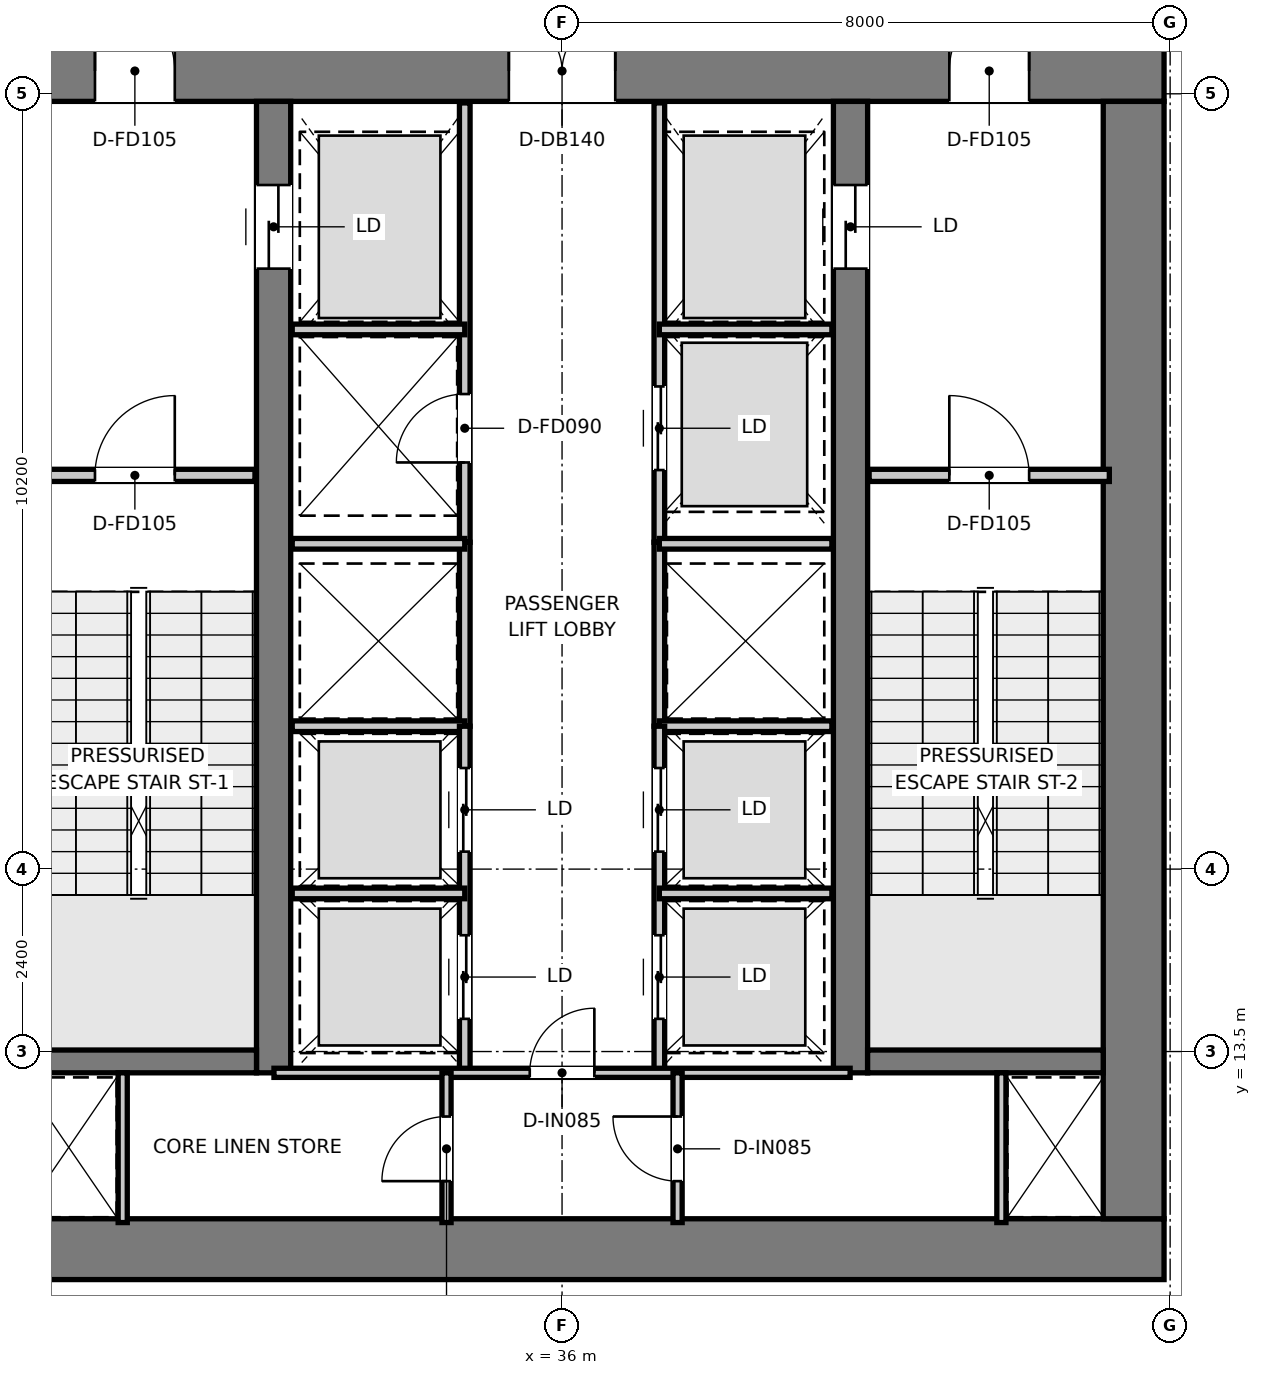
"""IFC4 building model, lengths in metres.
Left out: names, types, materials, properties, quantities, classifications, styles, units other than length and angle.
Written with IfcOpenShell. Run it as: python <this file> out.ifc"""

import sys

from ifc_helpers import new_model, si_unit, direction, frame, frame_2d, origin, place, context, subcontext, project, spatial, rectangle, extrude, element, fill, save


model = new_model("IFC4")
c1 = context("Model", 3, precision=1e-05, world=origin(), true_north=direction((0.0, 1.0)))
c2 = subcontext(c1, "Body", "Model", "MODEL_VIEW")
j1 = project(units=[si_unit("LENGTHUNIT", "METRE"), si_unit("PLANEANGLEUNIT", "RADIAN")], contexts=[c1])
p1 = place(None, origin())
s1 = spatial("IfcSite", under=j1, at=p1, CompositionType="ELEMENT")
p2 = place(p1, origin())
s2 = spatial("IfcBuilding", under=s1, at=p2, CompositionType="ELEMENT")
p3 = place(p2, frame((0.0, 0.0, 5.4)))
s3 = spatial("IfcBuildingStorey", under=s2, at=p3, CompositionType="ELEMENT", Elevation=5.4)
p4 = place(p3, frame((28.08, 10.9, 0.0), z_axis=(0.0, 0.0, 1.0), x_axis=(1.0, 0.0, 0.0)))
e1 = element("IfcWall", 1, at=p4, inside=s3, PredefinedType="SHEAR", context=c2, shape_type="SweptSolid", body=[
    extrude(rectangle(XDim=15.84, YDim=0.8, at=frame_2d((7.92, 0.0))), origin(), (0.0, 0.0, 1.0), 5.0),
])
p5 = place(p3, frame((28.08, 26.4, 0.0), z_axis=(0.0, 0.0, 1.0), x_axis=(1.0, 0.0, 0.0)))
e2 = element("IfcWall", 2, at=p5, inside=s3, PredefinedType="SHEAR", context=c2, shape_type="SweptSolid", body=[
    extrude(rectangle(XDim=15.84, YDim=0.8, at=frame_2d((7.92, 0.0))), origin(), (0.0, 0.0, 1.0), 5.0),
])
p6 = place(p5, frame((7.22, 0.0, 0.0)))
e3 = element("IfcOpeningElement", 3, at=p6, cuts=e2, PredefinedType="OPENING", context=c2, shape_type="SweptSolid", body=[
    extrude(rectangle(XDim=1.4, YDim=2.2, at=frame_2d((0.7, 1.1))), frame((0.0, 0.41, 0.0), z_axis=(0.0, -1.0, 0.0), x_axis=(1.0, 0.0, 0.0)), (0.0, 0.0, 1.0), 0.82),
])
p7 = place(p5, frame((1.775, 0.0, 0.0)))
e4 = element("IfcOpeningElement", 4, at=p7, cuts=e2, PredefinedType="OPENING", context=c2, shape_type="SweptSolid", body=[
    extrude(rectangle(XDim=1.05, YDim=2.1, at=frame_2d((0.525, 1.05))), frame((0.0, 0.41, 0.0), z_axis=(0.0, -1.0, 0.0), x_axis=(1.0, 0.0, 0.0)), (0.0, 0.0, 1.0), 0.82),
])
p8 = place(p5, frame((13.015, 0.0, 0.0)))
e5 = element("IfcOpeningElement", 5, at=p8, cuts=e2, PredefinedType="OPENING", context=c2, shape_type="SweptSolid", body=[
    extrude(rectangle(XDim=1.05, YDim=2.1, at=frame_2d((0.525, 1.05))), frame((0.0, 0.41, 0.0), z_axis=(0.0, -1.0, 0.0), x_axis=(1.0, 0.0, 0.0)), (0.0, 0.0, 1.0), 0.82),
])
p9 = place(p3, frame((43.52, 11.3, 0.0), z_axis=(0.0, 0.0, 1.0), x_axis=(0.0, 1.0, 0.0)))
e6 = element("IfcWall", 6, at=p9, inside=s3, PredefinedType="SHEAR", context=c2, shape_type="SweptSolid", body=[
    extrude(rectangle(XDim=14.7, YDim=0.8, at=frame_2d((7.35, 0.0))), origin(), (0.0, 0.0, 1.0), 5.0),
])
p10 = place(p3, frame((32.205, 13.22, 0.0), z_axis=(0.0, 0.0, 1.0), x_axis=(0.0, 1.0, 0.0)))
e7 = element("IfcWall", 7, at=p10, inside=s3, PredefinedType="SHEAR", context=c2, shape_type="SweptSolid", body=[
    extrude(rectangle(XDim=12.78, YDim=0.45, at=frame_2d((6.39, 0.0))), origin(), (0.0, 0.0, 1.0), 5.0),
])
p11 = place(p10, frame((10.58, 0.0, 0.0)))
e8 = element("IfcOpeningElement", 8, at=p11, cuts=e7, PredefinedType="OPENING", context=c2, shape_type="SweptSolid", body=[
    extrude(rectangle(XDim=1.1, YDim=2.15, at=frame_2d((0.55, 1.075))), frame((0.0, 0.235, 0.0), z_axis=(0.0, -1.0, 0.0), x_axis=(1.0, 0.0, 0.0)), (0.0, 0.0, 1.0), 0.47),
])
p12 = place(p3, frame((39.795, 13.22, 0.0), z_axis=(0.0, 0.0, 1.0), x_axis=(0.0, 1.0, 0.0)))
e9 = element("IfcWall", 9, at=p12, inside=s3, PredefinedType="SHEAR", context=c2, shape_type="SweptSolid", body=[
    extrude(rectangle(XDim=12.78, YDim=0.45, at=frame_2d((6.39, 0.0))), origin(), (0.0, 0.0, 1.0), 5.0),
])
p13 = place(p12, frame((10.58, 0.0, 0.0)))
e10 = element("IfcOpeningElement", 10, at=p13, cuts=e9, PredefinedType="OPENING", context=c2, shape_type="SweptSolid", body=[
    extrude(rectangle(XDim=1.1, YDim=2.15, at=frame_2d((0.55, 1.075))), frame((0.0, 0.235, 0.0), z_axis=(0.0, -1.0, 0.0), x_axis=(1.0, 0.0, 0.0)), (0.0, 0.0, 1.0), 0.47),
])
for number, where, z_axis, x_axis in (
    (11, (28.88, 13.37, 0.0), (0.0, 0.0, 1.0), (1.0, 0.0, 0.0)),
    (12, (40.02, 13.37, 0.0), (0.0, 0.0, 1.0), (1.0, 0.0, 0.0)),
):
    element("IfcWall", number, at=place(p3, frame(where, z_axis=z_axis, x_axis=x_axis)), inside=s3, PredefinedType="SHEAR", context=c2, shape_type="SweptSolid", body=[
        extrude(rectangle(XDim=3.1, YDim=0.3, at=frame_2d((1.55, 0.0))), origin(), (0.0, 0.0, 1.0), 5.0),
    ])
p14 = place(p3, frame((28.8, 21.08, 0.0), z_axis=(0.0, 0.0, 1.0), x_axis=(1.0, 0.0, 0.0)))
e13 = element("IfcWall", 13, at=p14, inside=s3, PredefinedType="PARTITIONING", context=c2, shape_type="SweptSolid", body=[
    extrude(rectangle(XDim=3.16, YDim=0.16, at=frame_2d((1.58, 0.0))), origin(), (0.0, 0.0, 1.0), 4.7),
])
p15 = place(p14, frame((1.055, 0.0, 0.0)))
e14 = element("IfcOpeningElement", 14, at=p15, cuts=e13, PredefinedType="OPENING", context=c2, shape_type="SweptSolid", body=[
    extrude(rectangle(XDim=1.05, YDim=2.1, at=frame_2d((0.525, 1.05))), frame((0.0, 0.09, 0.0), z_axis=(0.0, -1.0, 0.0), x_axis=(1.0, 0.0, 0.0)), (0.0, 0.0, 1.0), 0.18),
])
p16 = place(p3, frame((40.04, 21.08, 0.0), z_axis=(0.0, 0.0, 1.0), x_axis=(1.0, 0.0, 0.0)))
e15 = element("IfcWall", 15, at=p16, inside=s3, PredefinedType="PARTITIONING", context=c2, shape_type="SweptSolid", body=[
    extrude(rectangle(XDim=3.16, YDim=0.16, at=frame_2d((1.58, 0.0))), origin(), (0.0, 0.0, 1.0), 4.7),
])
p17 = place(p16, frame((1.055, 0.0, 0.0)))
e16 = element("IfcOpeningElement", 16, at=p17, cuts=e15, PredefinedType="OPENING", context=c2, shape_type="SweptSolid", body=[
    extrude(rectangle(XDim=1.05, YDim=2.1, at=frame_2d((0.525, 1.05))), frame((0.0, 0.09, 0.0), z_axis=(0.0, -1.0, 0.0), x_axis=(1.0, 0.0, 0.0)), (0.0, 0.0, 1.0), 0.18),
])
p18 = place(p3, frame((34.72, 20.2, 0.0), z_axis=(0.0, 0.0, 1.0), x_axis=(0.0, 1.0, 0.0)))
e17 = element("IfcWall", 17, at=p18, inside=s3, PredefinedType="PARTITIONING", context=c2, shape_type="SweptSolid", body=[
    extrude(rectangle(XDim=5.78, YDim=0.14, at=frame_2d((2.89, 0.0))), origin(), (0.0, 0.0, 1.0), 3.5),
])
p19 = place(p18, frame((1.05, 0.0, 0.0)))
e18 = element("IfcOpeningElement", 18, at=p19, cuts=e17, PredefinedType="OPENING", context=c2, shape_type="SweptSolid", body=[
    extrude(rectangle(XDim=0.9, YDim=2.1, at=frame_2d((0.45, 1.05))), frame((0.0, 0.08, 0.0), z_axis=(0.0, -1.0, 0.0), x_axis=(1.0, 0.0, 0.0)), (0.0, 0.0, 1.0), 0.16),
])
p20 = place(p3, frame((37.28, 20.2, 0.0), z_axis=(0.0, 0.0, 1.0), x_axis=(0.0, 1.0, 0.0)))
e19 = element("IfcWall", 19, at=p20, inside=s3, PredefinedType="PARTITIONING", context=c2, shape_type="SweptSolid", body=[
    extrude(rectangle(XDim=5.78, YDim=0.14, at=frame_2d((2.89, 0.0))), origin(), (0.0, 0.0, 1.0), 3.5),
])
p21 = place(p20, frame((0.95, 0.0, 0.0)))
e20 = element("IfcOpeningElement", 20, at=p21, cuts=e19, PredefinedType="OPENING", context=c2, shape_type="SweptSolid", body=[
    extrude(rectangle(XDim=1.1, YDim=2.15, at=frame_2d((0.55, 1.075))), frame((0.0, 0.08, 0.0), z_axis=(0.0, -1.0, 0.0), x_axis=(1.0, 0.0, 0.0)), (0.0, 0.0, 1.0), 0.16),
])
for number, where, z_axis, x_axis in (
    (21, (32.45, 23.0, 0.0), (0.0, 0.0, 1.0), (1.0, 0.0, 0.0)),
    (22, (37.28, 23.0, 0.0), (0.0, 0.0, 1.0), (1.0, 0.0, 0.0)),
):
    element("IfcWall", number, at=place(p3, frame(where, z_axis=z_axis, x_axis=x_axis)), inside=s3, PredefinedType="PARTITIONING", context=c2, shape_type="SweptSolid", body=[
        extrude(rectangle(XDim=2.27, YDim=0.14, at=frame_2d((1.135, 0.0))), origin(), (0.0, 0.0, 1.0), 3.5),
    ])
for number, where, z_axis, x_axis in (
    (23, (34.72, 17.78, 0.0), (0.0, 0.0, 1.0), (0.0, 1.0, 0.0)),
    (24, (37.28, 17.78, 0.0), (0.0, 0.0, 1.0), (0.0, 1.0, 0.0)),
):
    element("IfcWall", number, at=place(p3, frame(where, z_axis=z_axis, x_axis=x_axis)), inside=s3, PredefinedType="PARTITIONING", context=c2, shape_type="SweptSolid", body=[
        extrude(rectangle(XDim=2.42, YDim=0.14, at=frame_2d((1.21, 0.0))), origin(), (0.0, 0.0, 1.0), 4.7),
    ])
for number, where, z_axis, x_axis in (
    (25, (32.45, 17.78, 0.0), (0.0, 0.0, 1.0), (1.0, 0.0, 0.0)),
    (26, (32.45, 20.18, 0.0), (0.0, 0.0, 1.0), (1.0, 0.0, 0.0)),
    (27, (37.28, 17.78, 0.0), (0.0, 0.0, 1.0), (1.0, 0.0, 0.0)),
    (28, (37.28, 20.18, 0.0), (0.0, 0.0, 1.0), (1.0, 0.0, 0.0)),
):
    element("IfcWall", number, at=place(p3, frame(where, z_axis=z_axis, x_axis=x_axis)), inside=s3, PredefinedType="PARTITIONING", context=c2, shape_type="SweptSolid", body=[
        extrude(rectangle(XDim=2.27, YDim=0.14, at=frame_2d((1.135, 0.0))), origin(), (0.0, 0.0, 1.0), 4.7),
    ])
p22 = place(p3, frame((34.72, 13.22, 0.0), z_axis=(0.0, 0.0, 1.0), x_axis=(0.0, 1.0, 0.0)))
e29 = element("IfcWall", 29, at=p22, inside=s3, PredefinedType="PARTITIONING", context=c2, shape_type="SweptSolid", body=[
    extrude(rectangle(XDim=4.56, YDim=0.14, at=frame_2d((2.28, 0.0))), origin(), (0.0, 0.0, 1.0), 4.7),
])
p23 = place(p22, frame((0.71, 0.0, 0.0)))
e30 = element("IfcOpeningElement", 30, at=p23, cuts=e29, PredefinedType="OPENING", context=c2, shape_type="SweptSolid", body=[
    extrude(rectangle(XDim=1.1, YDim=2.15, at=frame_2d((0.55, 1.075))), frame((0.0, 0.08, 0.0), z_axis=(0.0, -1.0, 0.0), x_axis=(1.0, 0.0, 0.0)), (0.0, 0.0, 1.0), 0.16),
])
p24 = place(p22, frame((2.91, 0.0, 0.0)))
e31 = element("IfcOpeningElement", 31, at=p24, cuts=e29, PredefinedType="OPENING", context=c2, shape_type="SweptSolid", body=[
    extrude(rectangle(XDim=1.1, YDim=2.15, at=frame_2d((0.55, 1.075))), frame((0.0, 0.08, 0.0), z_axis=(0.0, -1.0, 0.0), x_axis=(1.0, 0.0, 0.0)), (0.0, 0.0, 1.0), 0.16),
])
p25 = place(p3, frame((32.45, 15.58, 0.0), z_axis=(0.0, 0.0, 1.0), x_axis=(1.0, 0.0, 0.0)))
e32 = element("IfcWall", 32, at=p25, inside=s3, PredefinedType="PARTITIONING", context=c2, shape_type="SweptSolid", body=[
    extrude(rectangle(XDim=2.27, YDim=0.14, at=frame_2d((1.135, 0.0))), origin(), (0.0, 0.0, 1.0), 4.7),
])
p26 = place(p3, frame((37.28, 13.22, 0.0), z_axis=(0.0, 0.0, 1.0), x_axis=(0.0, 1.0, 0.0)))
e33 = element("IfcWall", 33, at=p26, inside=s3, PredefinedType="PARTITIONING", context=c2, shape_type="SweptSolid", body=[
    extrude(rectangle(XDim=4.56, YDim=0.14, at=frame_2d((2.28, 0.0))), origin(), (0.0, 0.0, 1.0), 4.7),
])
p27 = place(p26, frame((0.71, 0.0, 0.0)))
e34 = element("IfcOpeningElement", 34, at=p27, cuts=e33, PredefinedType="OPENING", context=c2, shape_type="SweptSolid", body=[
    extrude(rectangle(XDim=1.1, YDim=2.15, at=frame_2d((0.55, 1.075))), frame((0.0, 0.08, 0.0), z_axis=(0.0, -1.0, 0.0), x_axis=(1.0, 0.0, 0.0)), (0.0, 0.0, 1.0), 0.16),
])
p28 = place(p26, frame((2.91, 0.0, 0.0)))
e35 = element("IfcOpeningElement", 35, at=p28, cuts=e33, PredefinedType="OPENING", context=c2, shape_type="SweptSolid", body=[
    extrude(rectangle(XDim=1.1, YDim=2.15, at=frame_2d((0.55, 1.075))), frame((0.0, 0.08, 0.0), z_axis=(0.0, -1.0, 0.0), x_axis=(1.0, 0.0, 0.0)), (0.0, 0.0, 1.0), 0.16),
])
p29 = place(p3, frame((37.28, 15.58, 0.0), z_axis=(0.0, 0.0, 1.0), x_axis=(1.0, 0.0, 0.0)))
e36 = element("IfcWall", 36, at=p29, inside=s3, PredefinedType="PARTITIONING", context=c2, shape_type="SweptSolid", body=[
    extrude(rectangle(XDim=2.27, YDim=0.14, at=frame_2d((1.135, 0.0))), origin(), (0.0, 0.0, 1.0), 4.7),
])
for number, where, z_axis, x_axis in (
    (37, (30.22, 11.25, 0.0), (0.0, 0.0, 1.0), (0.0, 1.0, 0.0)),
    (38, (41.78, 11.25, 0.0), (0.0, 0.0, 1.0), (0.0, 1.0, 0.0)),
):
    element("IfcWall", number, at=place(p3, frame(where, z_axis=z_axis, x_axis=x_axis)), inside=s3, PredefinedType="PARTITIONING", context=c2, shape_type="SweptSolid", body=[
        extrude(rectangle(XDim=1.97, YDim=0.12, at=frame_2d((0.985, 0.0))), origin(), (0.0, 0.0, 1.0), 4.7),
    ])
p30 = place(p3, frame((32.21, 13.22, 0.0), z_axis=(0.0, 0.0, 1.0), x_axis=(1.0, 0.0, 0.0)))
e39 = element("IfcWall", 39, at=p30, inside=s3, PredefinedType="PARTITIONING", context=c2, shape_type="SweptSolid", body=[
    extrude(rectangle(XDim=7.58, YDim=0.12, at=frame_2d((3.79, 0.0))), origin(), (0.0, 0.0, 1.0), 4.7),
])
p31 = place(p30, frame((3.365, 0.0, 0.0)))
e40 = element("IfcOpeningElement", 40, at=p31, cuts=e39, PredefinedType="OPENING", context=c2, shape_type="SweptSolid", body=[
    extrude(rectangle(XDim=0.85, YDim=2.1, at=frame_2d((0.425, 1.05))), frame((0.0, 0.07, 0.0), z_axis=(0.0, -1.0, 0.0), x_axis=(1.0, 0.0, 0.0)), (0.0, 0.0, 1.0), 0.14),
])
p32 = place(p3, frame((34.48, 11.25, 0.0), z_axis=(0.0, 0.0, 1.0), x_axis=(0.0, 1.0, 0.0)))
e41 = element("IfcWall", 41, at=p32, inside=s3, PredefinedType="PARTITIONING", context=c2, shape_type="SweptSolid", body=[
    extrude(rectangle(XDim=1.97, YDim=0.12, at=frame_2d((0.985, 0.0))), origin(), (0.0, 0.0, 1.0), 4.7),
])
p33 = place(p32, frame((0.545, 0.0, 0.0)))
e42 = element("IfcOpeningElement", 42, at=p33, cuts=e41, PredefinedType="OPENING", context=c2, shape_type="SweptSolid", body=[
    extrude(rectangle(XDim=0.85, YDim=2.1, at=frame_2d((0.425, 1.05))), frame((0.0, 0.07, 0.0), z_axis=(0.0, -1.0, 0.0), x_axis=(1.0, 0.0, 0.0)), (0.0, 0.0, 1.0), 0.14),
])
p34 = place(p3, frame((37.52, 11.25, 0.0), z_axis=(0.0, 0.0, 1.0), x_axis=(0.0, 1.0, 0.0)))
e43 = element("IfcWall", 43, at=p34, inside=s3, PredefinedType="PARTITIONING", context=c2, shape_type="SweptSolid", body=[
    extrude(rectangle(XDim=1.97, YDim=0.12, at=frame_2d((0.985, 0.0))), origin(), (0.0, 0.0, 1.0), 4.7),
])
p35 = place(p34, frame((0.545, 0.0, 0.0)))
e44 = element("IfcOpeningElement", 44, at=p35, cuts=e43, PredefinedType="OPENING", context=c2, shape_type="SweptSolid", body=[
    extrude(rectangle(XDim=0.85, YDim=2.1, at=frame_2d((0.425, 1.05))), frame((0.0, 0.07, 0.0), z_axis=(0.0, -1.0, 0.0), x_axis=(1.0, 0.0, 0.0)), (0.0, 0.0, 1.0), 0.14),
])
p36 = place(p15, origin())
e45 = element("IfcDoor", 45, at=p36, inside=s3, OperationType="SINGLE_SWING_RIGHT", PredefinedType="DOOR", context=c2, shape_type="SweptSolid", body=[
    extrude(rectangle(XDim=1.05, YDim=2.1, at=frame_2d((0.525, 1.05))), frame((0.0, 0.025, 0.0), z_axis=(0.0, -1.0, 0.0), x_axis=(1.0, 0.0, 0.0)), (0.0, 0.0, 1.0), 0.05),
])
fill(e14, e45)
p37 = place(p17, origin())
e46 = element("IfcDoor", 46, at=p37, inside=s3, OperationType="SINGLE_SWING_LEFT", PredefinedType="DOOR", context=c2, shape_type="SweptSolid", body=[
    extrude(rectangle(XDim=1.05, YDim=2.1, at=frame_2d((0.525, 1.05))), frame((0.0, 0.025, 0.0), z_axis=(0.0, -1.0, 0.0), x_axis=(1.0, 0.0, 0.0)), (0.0, 0.0, 1.0), 0.05),
])
fill(e16, e46)
p38 = place(p6, origin())
e47 = element("IfcDoor", 47, at=p38, inside=s3, OperationType="DOUBLE_DOOR_SINGLE_SWING", PredefinedType="DOOR", context=c2, shape_type="SweptSolid", body=[
    extrude(rectangle(XDim=1.4, YDim=2.2, at=frame_2d((0.7, 1.1))), frame((0.0, 0.025, 0.0), z_axis=(0.0, -1.0, 0.0), x_axis=(1.0, 0.0, 0.0)), (0.0, 0.0, 1.0), 0.05),
])
fill(e3, e47)
p39 = place(p7, origin())
e48 = element("IfcDoor", 48, at=p39, inside=s3, OperationType="SINGLE_SWING_LEFT", PredefinedType="DOOR", context=c2, shape_type="SweptSolid", body=[
    extrude(rectangle(XDim=1.05, YDim=2.1, at=frame_2d((0.525, 1.05))), frame((0.0, 0.025, 0.0), z_axis=(0.0, -1.0, 0.0), x_axis=(1.0, 0.0, 0.0)), (0.0, 0.0, 1.0), 0.05),
])
fill(e4, e48)
p40 = place(p8, origin())
e49 = element("IfcDoor", 49, at=p40, inside=s3, OperationType="SINGLE_SWING_RIGHT", PredefinedType="DOOR", context=c2, shape_type="SweptSolid", body=[
    extrude(rectangle(XDim=1.05, YDim=2.1, at=frame_2d((0.525, 1.05))), frame((0.0, 0.025, 0.0), z_axis=(0.0, -1.0, 0.0), x_axis=(1.0, 0.0, 0.0)), (0.0, 0.0, 1.0), 0.05),
])
fill(e5, e49)
p41 = place(p11, origin())
e50 = element("IfcDoor", 50, at=p41, inside=s3, OperationType="DOUBLE_DOOR_SLIDING", PredefinedType="DOOR", context=c2, shape_type="SweptSolid", body=[
    extrude(rectangle(XDim=1.1, YDim=2.15, at=frame_2d((0.55, 1.075))), frame((0.0, 0.025, 0.0), z_axis=(0.0, -1.0, 0.0), x_axis=(1.0, 0.0, 0.0)), (0.0, 0.0, 1.0), 0.05),
])
fill(e8, e50)
p42 = place(p13, origin())
e51 = element("IfcDoor", 51, at=p42, inside=s3, OperationType="DOUBLE_DOOR_SLIDING", PredefinedType="DOOR", context=c2, shape_type="SweptSolid", body=[
    extrude(rectangle(XDim=1.1, YDim=2.15, at=frame_2d((0.55, 1.075))), frame((0.0, 0.025, 0.0), z_axis=(0.0, -1.0, 0.0), x_axis=(1.0, 0.0, 0.0)), (0.0, 0.0, 1.0), 0.05),
])
fill(e10, e51)
p43 = place(p19, origin())
e52 = element("IfcDoor", 52, at=p43, inside=s3, OperationType="SINGLE_SWING_LEFT", PredefinedType="DOOR", context=c2, shape_type="SweptSolid", body=[
    extrude(rectangle(XDim=0.9, YDim=2.1, at=frame_2d((0.45, 1.05))), frame((0.0, 0.025, 0.0), z_axis=(0.0, -1.0, 0.0), x_axis=(1.0, 0.0, 0.0)), (0.0, 0.0, 1.0), 0.05),
])
fill(e18, e52)
p44 = place(p21, origin())
e53 = element("IfcDoor", 53, at=p44, inside=s3, OperationType="DOUBLE_DOOR_SLIDING", PredefinedType="DOOR", context=c2, shape_type="SweptSolid", body=[
    extrude(rectangle(XDim=1.1, YDim=2.15, at=frame_2d((0.55, 1.075))), frame((0.0, 0.025, 0.0), z_axis=(0.0, -1.0, 0.0), x_axis=(1.0, 0.0, 0.0)), (0.0, 0.0, 1.0), 0.05),
])
fill(e20, e53)
p45 = place(p23, origin())
e54 = element("IfcDoor", 54, at=p45, inside=s3, OperationType="DOUBLE_DOOR_SLIDING", PredefinedType="DOOR", context=c2, shape_type="SweptSolid", body=[
    extrude(rectangle(XDim=1.1, YDim=2.15, at=frame_2d((0.55, 1.075))), frame((0.0, 0.025, 0.0), z_axis=(0.0, -1.0, 0.0), x_axis=(1.0, 0.0, 0.0)), (0.0, 0.0, 1.0), 0.05),
])
fill(e30, e54)
p46 = place(p24, origin())
e55 = element("IfcDoor", 55, at=p46, inside=s3, OperationType="DOUBLE_DOOR_SLIDING", PredefinedType="DOOR", context=c2, shape_type="SweptSolid", body=[
    extrude(rectangle(XDim=1.1, YDim=2.15, at=frame_2d((0.55, 1.075))), frame((0.0, 0.025, 0.0), z_axis=(0.0, -1.0, 0.0), x_axis=(1.0, 0.0, 0.0)), (0.0, 0.0, 1.0), 0.05),
])
fill(e31, e55)
p47 = place(p27, origin())
e56 = element("IfcDoor", 56, at=p47, inside=s3, OperationType="DOUBLE_DOOR_SLIDING", PredefinedType="DOOR", context=c2, shape_type="SweptSolid", body=[
    extrude(rectangle(XDim=1.1, YDim=2.15, at=frame_2d((0.55, 1.075))), frame((0.0, 0.025, 0.0), z_axis=(0.0, -1.0, 0.0), x_axis=(1.0, 0.0, 0.0)), (0.0, 0.0, 1.0), 0.05),
])
fill(e34, e56)
p48 = place(p28, origin())
e57 = element("IfcDoor", 57, at=p48, inside=s3, OperationType="DOUBLE_DOOR_SLIDING", PredefinedType="DOOR", context=c2, shape_type="SweptSolid", body=[
    extrude(rectangle(XDim=1.1, YDim=2.15, at=frame_2d((0.55, 1.075))), frame((0.0, 0.025, 0.0), z_axis=(0.0, -1.0, 0.0), x_axis=(1.0, 0.0, 0.0)), (0.0, 0.0, 1.0), 0.05),
])
fill(e35, e57)
p49 = place(p31, origin())
e58 = element("IfcDoor", 58, at=p49, inside=s3, OperationType="SINGLE_SWING_RIGHT", PredefinedType="DOOR", context=c2, shape_type="SweptSolid", body=[
    extrude(rectangle(XDim=0.85, YDim=2.1, at=frame_2d((0.425, 1.05))), frame((0.0, 0.025, 0.0), z_axis=(0.0, -1.0, 0.0), x_axis=(1.0, 0.0, 0.0)), (0.0, 0.0, 1.0), 0.05),
])
fill(e40, e58)
p50 = place(p33, origin())
e59 = element("IfcDoor", 59, at=p50, inside=s3, OperationType="SINGLE_SWING_LEFT", PredefinedType="DOOR", context=c2, shape_type="SweptSolid", body=[
    extrude(rectangle(XDim=0.85, YDim=2.1, at=frame_2d((0.425, 1.05))), frame((0.0, 0.025, 0.0), z_axis=(0.0, -1.0, 0.0), x_axis=(1.0, 0.0, 0.0)), (0.0, 0.0, 1.0), 0.05),
])
fill(e42, e59)
p51 = place(p35, origin())
e60 = element("IfcDoor", 60, at=p51, inside=s3, OperationType="SINGLE_SWING_RIGHT", PredefinedType="DOOR", context=c2, shape_type="SweptSolid", body=[
    extrude(rectangle(XDim=0.85, YDim=2.1, at=frame_2d((0.425, 1.05))), frame((0.0, 0.025, 0.0), z_axis=(0.0, -1.0, 0.0), x_axis=(1.0, 0.0, 0.0)), (0.0, 0.0, 1.0), 0.05),
])
fill(e44, e60)
save(model, sys.argv[1])
